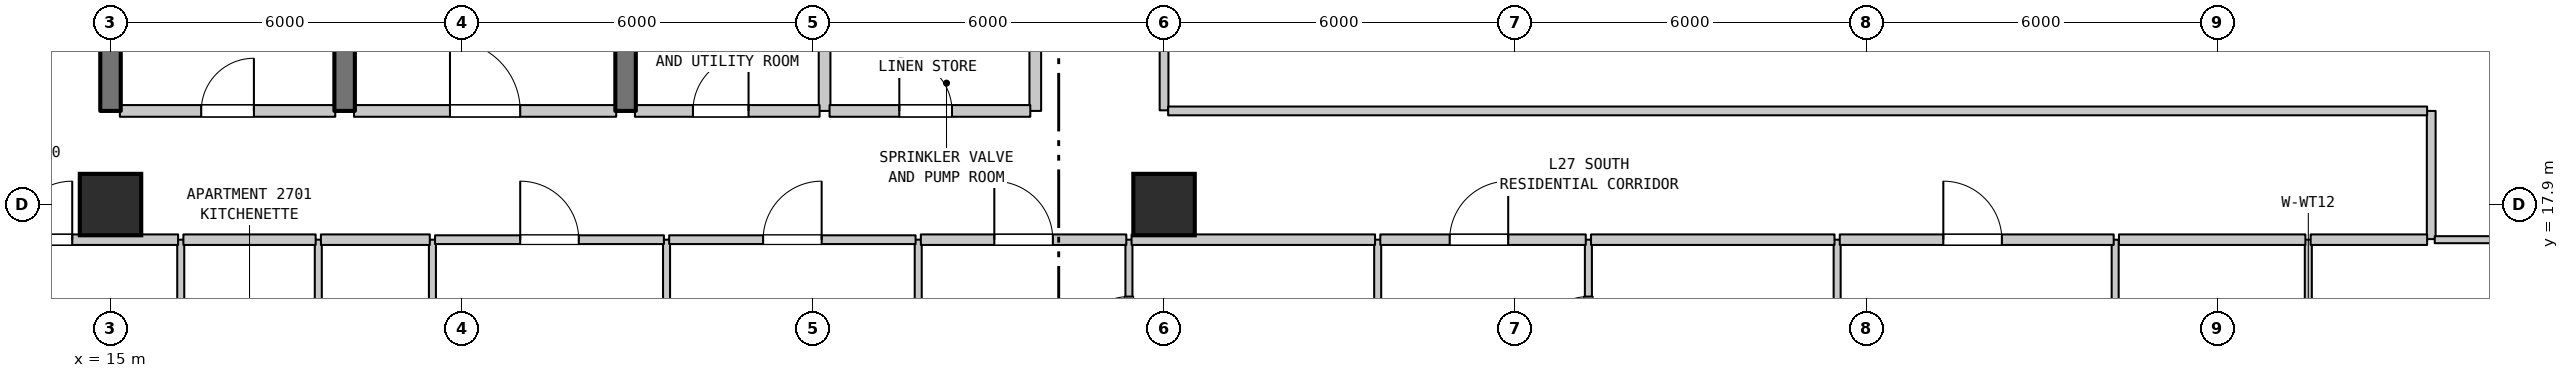
"""IFC4 building model, lengths in metres.
Left out: names, types, materials, properties, quantities, classifications, styles, units other than length and angle.
Written with IfcOpenShell. Run it as: python <this file> out.ifc"""

import sys

from ifc_helpers import new_model, si_unit, direction, frame, frame_2d, origin, origin_2d, place, context, subcontext, project, spatial, rectangle, extrude, element, fill, save


model = new_model("IFC4")
c1 = context("Model", 3, precision=1e-05, world=origin(), true_north=direction((0.0, 1.0)))
c2 = subcontext(c1, "Body", "Model", "MODEL_VIEW")
j1 = project(units=[si_unit("LENGTHUNIT", "METRE"), si_unit("PLANEANGLEUNIT", "RADIAN")], contexts=[c1])
p1 = place(None, origin())
s1 = spatial("IfcSite", under=j1, at=p1, CompositionType="ELEMENT")
p2 = place(p1, origin())
s2 = spatial("IfcBuilding", under=s1, at=p2, CompositionType="ELEMENT")
p3 = place(p2, frame((0.0, 0.0, 113.1)))
s3 = spatial("IfcBuildingStorey", under=s2, at=p3, CompositionType="ELEMENT", Elevation=113.1)
for number, where, z_axis, x_axis in (
    (1, (15.0, 17.9, 0.0), (0.0, 0.0, 1.0), (1.0, 0.0, 0.0)),
    (2, (33.0, 17.9, 0.0), (0.0, 0.0, 1.0), (1.0, 0.0, 0.0)),
):
    element("IfcColumn", number, at=place(p3, frame(where, z_axis=z_axis, x_axis=x_axis)), inside=s3, PredefinedType="COLUMN", context=c2, shape_type="SweptSolid", body=[
        extrude(rectangle(XDim=1.05, YDim=1.05, at=origin_2d()), origin(), (0.0, 0.0, 1.0), 3.7),
    ])
p4 = place(p3, frame((15.0, 19.5, 0.0), z_axis=(0.0, 0.0, 1.0), x_axis=(0.0, 1.0, 0.0)))
e3 = element("IfcWall", 3, at=p4, inside=s3, PredefinedType="SHEAR", context=c2, shape_type="SweptSolid", body=[
    extrude(rectangle(XDim=3.2, YDim=0.35, at=frame_2d((1.6, 0.0))), origin(), (0.0, 0.0, 1.0), 3.385),
])
p5 = place(p3, frame((16.2, 14.1, 0.0), z_axis=(0.0, 0.0, 1.0), x_axis=(0.0, 1.0, 0.0)))
e4 = element("IfcWall", 4, at=p5, inside=s3, PredefinedType="PARTITIONING", context=c2, shape_type="SweptSolid", body=[
    extrude(rectangle(XDim=3.2, YDim=0.12, at=frame_2d((1.6, 0.0))), origin(), (0.0, 0.0, 1.0), 3.385),
])
p6 = place(p5, frame((1.15, 0.0, 0.0)))
e5 = element("IfcOpeningElement", 5, at=p6, cuts=e4, PredefinedType="OPENING", context=c2, shape_type="SweptSolid", body=[
    extrude(rectangle(XDim=0.9, YDim=2.15, at=frame_2d((0.45, 1.075))), frame((0.0, 0.07, 0.0), z_axis=(0.0, -1.0, 0.0), x_axis=(1.0, 0.0, 0.0)), (0.0, 0.0, 1.0), 0.14),
])
p7 = place(p3, frame((18.55, 14.1, 0.0), z_axis=(0.0, 0.0, 1.0), x_axis=(0.0, 1.0, 0.0)))
e6 = element("IfcWall", 6, at=p7, inside=s3, PredefinedType="PARTITIONING", context=c2, shape_type="SweptSolid", body=[
    extrude(rectangle(XDim=3.2, YDim=0.12, at=frame_2d((1.6, 0.0))), origin(), (0.0, 0.0, 1.0), 3.385),
])
p8 = place(p3, frame((19.0, 19.5, 0.0), z_axis=(0.0, 0.0, 1.0), x_axis=(0.0, 1.0, 0.0)))
e7 = element("IfcWall", 7, at=p8, inside=s3, PredefinedType="SHEAR", context=c2, shape_type="SweptSolid", body=[
    extrude(rectangle(XDim=3.2, YDim=0.35, at=frame_2d((1.6, 0.0))), origin(), (0.0, 0.0, 1.0), 3.385),
])
p9 = place(p3, frame((20.5, 7.154, 0.0), z_axis=(0.0, 0.0, 1.0), x_axis=(0.0, 1.0, 0.0)))
e8 = element("IfcWall", 8, at=p9, inside=s3, PredefinedType="PARTITIONING", context=c2, shape_type="SweptSolid", body=[
    extrude(rectangle(XDim=10.146, YDim=0.12, at=frame_2d((5.073, 0.0))), origin(), (0.0, 0.0, 1.0), 3.385),
])
p10 = place(p3, frame((23.8, 19.5, 0.0), z_axis=(0.0, 0.0, 1.0), x_axis=(0.0, 1.0, 0.0)))
e9 = element("IfcWall", 9, at=p10, inside=s3, PredefinedType="SHEAR", context=c2, shape_type="SweptSolid", body=[
    extrude(rectangle(XDim=3.2, YDim=0.35, at=frame_2d((1.6, 0.0))), origin(), (0.0, 0.0, 1.0), 3.385),
])
p11 = place(p3, frame((24.5, 0.71, 0.0), z_axis=(0.0, 0.0, 1.0), x_axis=(0.0, 1.0, 0.0)))
e10 = element("IfcWall", 10, at=p11, inside=s3, PredefinedType="PARTITIONING", context=c2, shape_type="SweptSolid", body=[
    extrude(rectangle(XDim=16.59, YDim=0.12, at=frame_2d((8.295, 0.0))), origin(), (0.0, 0.0, 1.0), 3.385),
])
p12 = place(p3, frame((27.2, 19.5, 0.0), z_axis=(0.0, 0.0, 1.0), x_axis=(0.0, 1.0, 0.0)))
e11 = element("IfcWall", 11, at=p12, inside=s3, PredefinedType="STANDARD", context=c2, shape_type="SweptSolid", body=[
    extrude(rectangle(XDim=1.6, YDim=0.2, at=frame_2d((0.8, 0.0))), origin(), (0.0, 0.0, 1.0), 3.385),
])
p13 = place(p3, frame((28.8, 0.71, 0.0), z_axis=(0.0, 0.0, 1.0), x_axis=(0.0, 1.0, 0.0)))
e12 = element("IfcWall", 12, at=p13, inside=s3, PredefinedType="PARTITIONING", context=c2, shape_type="SweptSolid", body=[
    extrude(rectangle(XDim=16.59, YDim=0.12, at=frame_2d((8.295, 0.0))), origin(), (0.0, 0.0, 1.0), 3.385),
])
p14 = place(p3, frame((30.8, 19.5, 0.0), z_axis=(0.0, 0.0, 1.0), x_axis=(0.0, 1.0, 0.0)))
e13 = element("IfcWall", 13, at=p14, inside=s3, PredefinedType="STANDARD", context=c2, shape_type="SweptSolid", body=[
    extrude(rectangle(XDim=1.6, YDim=0.2, at=frame_2d((0.8, 0.0))), origin(), (0.0, 0.0, 1.0), 3.385),
])
p15 = place(p3, frame((32.4, 14.6, 0.0), z_axis=(0.0, 0.0, 1.0), x_axis=(0.0, 1.0, 0.0)))
e14 = element("IfcWall", 14, at=p15, inside=s3, PredefinedType="PARTITIONING", context=c2, shape_type="SweptSolid", body=[
    extrude(rectangle(XDim=2.7, YDim=0.12, at=frame_2d((1.35, 0.0))), origin(), (0.0, 0.0, 1.0), 3.385),
])
p16 = place(p15, frame((0.828, 0.0, 0.0)))
e15 = element("IfcOpeningElement", 15, at=p16, cuts=e14, PredefinedType="OPENING", context=c2, shape_type="SweptSolid", body=[
    extrude(rectangle(XDim=0.9, YDim=2.1, at=frame_2d((0.45, 1.05))), frame((0.0, 0.07, 0.0), z_axis=(0.0, -1.0, 0.0), x_axis=(1.0, 0.0, 0.0)), (0.0, 0.0, 1.0), 0.14),
])
p17 = place(p3, frame((33.0, 19.51, 0.0), z_axis=(0.0, 0.0, 1.0), x_axis=(0.0, 1.0, 0.0)))
e16 = element("IfcWall", 16, at=p17, inside=s3, PredefinedType="STANDARD", context=c2, shape_type="SweptSolid", body=[
    extrude(rectangle(XDim=6.18, YDim=0.15, at=frame_2d((3.09, 0.0))), origin(), (0.0, 0.0, 1.0), 2.935),
])
p18 = place(p3, frame((36.65, 14.6, 0.0), z_axis=(0.0, 0.0, 1.0), x_axis=(0.0, 1.0, 0.0)))
e17 = element("IfcWall", 17, at=p18, inside=s3, PredefinedType="PARTITIONING", context=c2, shape_type="SweptSolid", body=[
    extrude(rectangle(XDim=2.7, YDim=0.12, at=frame_2d((1.35, 0.0))), origin(), (0.0, 0.0, 1.0), 3.385),
])
p19 = place(p3, frame((40.25, 14.6, 0.0), z_axis=(0.0, 0.0, 1.0), x_axis=(0.0, 1.0, 0.0)))
e18 = element("IfcWall", 18, at=p19, inside=s3, PredefinedType="PARTITIONING", context=c2, shape_type="SweptSolid", body=[
    extrude(rectangle(XDim=2.7, YDim=0.12, at=frame_2d((1.35, 0.0))), origin(), (0.0, 0.0, 1.0), 3.385),
])
p20 = place(p19, frame((0.828, 0.0, 0.0)))
e19 = element("IfcOpeningElement", 19, at=p20, cuts=e18, PredefinedType="OPENING", context=c2, shape_type="SweptSolid", body=[
    extrude(rectangle(XDim=0.9, YDim=2.1, at=frame_2d((0.45, 1.05))), frame((0.0, 0.07, 0.0), z_axis=(0.0, -1.0, 0.0), x_axis=(1.0, 0.0, 0.0)), (0.0, 0.0, 1.0), 0.14),
])
p21 = place(p3, frame((44.5, 14.85, 0.0), z_axis=(0.0, 0.0, 1.0), x_axis=(0.0, 1.0, 0.0)))
e20 = element("IfcWall", 20, at=p21, inside=s3, PredefinedType="PARTITIONING", context=c2, shape_type="SweptSolid", body=[
    extrude(rectangle(XDim=2.45, YDim=0.12, at=frame_2d((1.225, 0.0))), origin(), (0.0, 0.0, 1.0), 3.385),
])
for number, where, z_axis, x_axis in (
    (21, (49.25, 11.15, 0.0), (0.0, 0.0, 1.0), (0.0, 1.0, 0.0)),
    (22, (52.55, 11.15, 0.0), (0.0, 0.0, 1.0), (0.0, 1.0, 0.0)),
):
    element("IfcWall", number, at=place(p3, frame(where, z_axis=z_axis, x_axis=x_axis)), inside=s3, PredefinedType="PARTITIONING", context=c2, shape_type="SweptSolid", body=[
        extrude(rectangle(XDim=6.15, YDim=0.12, at=frame_2d((3.075, 0.0))), origin(), (0.0, 0.0, 1.0), 3.385),
    ])
p22 = place(p3, frame((54.65, 17.31, 0.0), z_axis=(0.0, 0.0, 1.0), x_axis=(0.0, 1.0, 0.0)))
e23 = element("IfcWall", 23, at=p22, inside=s3, PredefinedType="STANDARD", context=c2, shape_type="SweptSolid", body=[
    extrude(rectangle(XDim=2.19, YDim=0.15, at=frame_2d((1.095, 0.0))), origin(), (0.0, 0.0, 1.0), 3.385),
])
p23 = place(p3, frame((12.875, 17.3, 0.0), z_axis=(0.0, 0.0, 1.0), x_axis=(1.0, 0.0, 0.0)))
e24 = element("IfcWall", 24, at=p23, inside=s3, PredefinedType="STANDARD", context=c2, shape_type="SweptSolid", body=[
    extrude(rectangle(XDim=3.28, YDim=0.18, at=frame_2d((1.64, 0.0))), origin(), (0.0, 0.0, 1.0), 3.385),
])
p24 = place(p23, frame((0.471, 0.0, 0.0)))
e25 = element("IfcOpeningElement", 25, at=p24, cuts=e24, PredefinedType="OPENING", context=c2, shape_type="SweptSolid", body=[
    extrude(rectangle(XDim=1.0, YDim=2.15, at=frame_2d((0.5, 1.075))), frame((0.0, 0.1, 0.0), z_axis=(0.0, -1.0, 0.0), x_axis=(1.0, 0.0, 0.0)), (0.0, 0.0, 1.0), 0.2),
])
p25 = place(p3, frame((16.245, 17.3, 0.0), z_axis=(0.0, 0.0, 1.0), x_axis=(1.0, 0.0, 0.0)))
e26 = element("IfcWall", 26, at=p25, inside=s3, PredefinedType="STANDARD", context=c2, shape_type="SweptSolid", body=[
    extrude(rectangle(XDim=2.26, YDim=0.18, at=frame_2d((1.13, 0.0))), origin(), (0.0, 0.0, 1.0), 3.385),
])
p26 = place(p3, frame((18.595, 17.3, 0.0), z_axis=(0.0, 0.0, 1.0), x_axis=(1.0, 0.0, 0.0)))
e27 = element("IfcWall", 27, at=p26, inside=s3, PredefinedType="STANDARD", context=c2, shape_type="SweptSolid", body=[
    extrude(rectangle(XDim=1.86, YDim=0.18, at=frame_2d((0.93, 0.0))), origin(), (0.0, 0.0, 1.0), 3.385),
])
p27 = place(p3, frame((20.545, 17.3, 0.0), z_axis=(0.0, 0.0, 1.0), x_axis=(1.0, 0.0, 0.0)))
e28 = element("IfcWall", 28, at=p27, inside=s3, PredefinedType="STANDARD", context=c2, shape_type="SweptSolid", body=[
    extrude(rectangle(XDim=3.91, YDim=0.15, at=frame_2d((1.955, 0.0))), origin(), (0.0, 0.0, 1.0), 3.385),
])
p28 = place(p27, frame((1.455, 0.0, 0.0)))
e29 = element("IfcOpeningElement", 29, at=p28, cuts=e28, PredefinedType="OPENING", context=c2, shape_type="SweptSolid", body=[
    extrude(rectangle(XDim=1.0, YDim=2.15, at=frame_2d((0.5, 1.075))), frame((0.0, 0.085, 0.0), z_axis=(0.0, -1.0, 0.0), x_axis=(1.0, 0.0, 0.0)), (0.0, 0.0, 1.0), 0.17),
])
p29 = place(p3, frame((24.545, 17.3, 0.0), z_axis=(0.0, 0.0, 1.0), x_axis=(1.0, 0.0, 0.0)))
e30 = element("IfcWall", 30, at=p29, inside=s3, PredefinedType="STANDARD", context=c2, shape_type="SweptSolid", body=[
    extrude(rectangle(XDim=4.21, YDim=0.15, at=frame_2d((2.105, 0.0))), origin(), (0.0, 0.0, 1.0), 3.385),
])
p30 = place(p29, frame((1.605, 0.0, 0.0)))
e31 = element("IfcOpeningElement", 31, at=p30, cuts=e30, PredefinedType="OPENING", context=c2, shape_type="SweptSolid", body=[
    extrude(rectangle(XDim=1.0, YDim=2.15, at=frame_2d((0.5, 1.075))), frame((0.0, 0.085, 0.0), z_axis=(0.0, -1.0, 0.0), x_axis=(1.0, 0.0, 0.0)), (0.0, 0.0, 1.0), 0.17),
])
p31 = place(p3, frame((28.845, 17.3, 0.0), z_axis=(0.0, 0.0, 1.0), x_axis=(1.0, 0.0, 0.0)))
e32 = element("IfcWall", 32, at=p31, inside=s3, PredefinedType="STANDARD", context=c2, shape_type="SweptSolid", body=[
    extrude(rectangle(XDim=3.51, YDim=0.18, at=frame_2d((1.755, 0.0))), origin(), (0.0, 0.0, 1.0), 3.385),
])
p32 = place(p31, frame((1.255, 0.0, 0.0)))
e33 = element("IfcOpeningElement", 33, at=p32, cuts=e32, PredefinedType="OPENING", context=c2, shape_type="SweptSolid", body=[
    extrude(rectangle(XDim=1.0, YDim=2.15, at=frame_2d((0.5, 1.075))), frame((0.0, 0.1, 0.0), z_axis=(0.0, -1.0, 0.0), x_axis=(1.0, 0.0, 0.0)), (0.0, 0.0, 1.0), 0.2),
])
p33 = place(p3, frame((32.445, 17.3, 0.0), z_axis=(0.0, 0.0, 1.0), x_axis=(1.0, 0.0, 0.0)))
e34 = element("IfcWall", 34, at=p33, inside=s3, PredefinedType="STANDARD", context=c2, shape_type="SweptSolid", body=[
    extrude(rectangle(XDim=4.16, YDim=0.18, at=frame_2d((2.08, 0.0))), origin(), (0.0, 0.0, 1.0), 3.385),
])
p34 = place(p3, frame((36.695, 17.3, 0.0), z_axis=(0.0, 0.0, 1.0), x_axis=(1.0, 0.0, 0.0)))
e35 = element("IfcWall", 35, at=p34, inside=s3, PredefinedType="STANDARD", context=c2, shape_type="SweptSolid", body=[
    extrude(rectangle(XDim=3.51, YDim=0.18, at=frame_2d((1.755, 0.0))), origin(), (0.0, 0.0, 1.0), 3.385),
])
p35 = place(p34, frame((1.185, 0.0, 0.0)))
e36 = element("IfcOpeningElement", 36, at=p35, cuts=e35, PredefinedType="OPENING", context=c2, shape_type="SweptSolid", body=[
    extrude(rectangle(XDim=1.0, YDim=2.15, at=frame_2d((0.5, 1.075))), frame((0.0, 0.1, 0.0), z_axis=(0.0, -1.0, 0.0), x_axis=(1.0, 0.0, 0.0)), (0.0, 0.0, 1.0), 0.2),
])
p36 = place(p3, frame((40.295, 17.3, 0.0), z_axis=(0.0, 0.0, 1.0), x_axis=(1.0, 0.0, 0.0)))
e37 = element("IfcWall", 37, at=p36, inside=s3, PredefinedType="STANDARD", context=c2, shape_type="SweptSolid", body=[
    extrude(rectangle(XDim=4.16, YDim=0.18, at=frame_2d((2.08, 0.0))), origin(), (0.0, 0.0, 1.0), 3.385),
])
p37 = place(p3, frame((44.545, 17.3, 0.0), z_axis=(0.0, 0.0, 1.0), x_axis=(1.0, 0.0, 0.0)))
e38 = element("IfcWall", 38, at=p37, inside=s3, PredefinedType="STANDARD", context=c2, shape_type="SweptSolid", body=[
    extrude(rectangle(XDim=4.68, YDim=0.18, at=frame_2d((2.34, 0.0))), origin(), (0.0, 0.0, 1.0), 3.385),
])
p38 = place(p37, frame((1.769, 0.0, 0.0)))
e39 = element("IfcOpeningElement", 39, at=p38, cuts=e38, PredefinedType="OPENING", context=c2, shape_type="SweptSolid", body=[
    extrude(rectangle(XDim=1.0, YDim=2.15, at=frame_2d((0.5, 1.075))), frame((0.0, 0.1, 0.0), z_axis=(0.0, -1.0, 0.0), x_axis=(1.0, 0.0, 0.0)), (0.0, 0.0, 1.0), 0.2),
])
p39 = place(p3, frame((49.315, 17.3, 0.0), z_axis=(0.0, 0.0, 1.0), x_axis=(1.0, 0.0, 0.0)))
e40 = element("IfcWall", 40, at=p39, inside=s3, PredefinedType="STANDARD", context=c2, shape_type="SweptSolid", body=[
    extrude(rectangle(XDim=3.185, YDim=0.18, at=frame_2d((1.593, 0.0))), origin(), (0.0, 0.0, 1.0), 3.385),
])
p40 = place(p3, frame((52.59, 17.3, 0.0), z_axis=(0.0, 0.0, 1.0), x_axis=(1.0, 0.0, 0.0)))
e41 = element("IfcWall", 41, at=p40, inside=s3, PredefinedType="STANDARD", context=c2, shape_type="SweptSolid", body=[
    extrude(rectangle(XDim=1.99, YDim=0.18, at=frame_2d((0.995, 0.0))), origin(), (0.0, 0.0, 1.0), 3.385),
])
p41 = place(p3, frame((54.71, 17.3, 0.0), z_axis=(0.0, 0.0, 1.0), x_axis=(1.0, 0.0, 0.0)))
e42 = element("IfcWall", 42, at=p41, inside=s3, PredefinedType="PARTITIONING", context=c2, shape_type="SweptSolid", body=[
    extrude(rectangle(XDim=1.635, YDim=0.12, at=frame_2d((0.817, 0.0))), origin(), (0.0, 0.0, 1.0), 3.385),
])
p42 = place(p3, frame((15.16, 19.5, 0.0), z_axis=(0.0, 0.0, 1.0), x_axis=(1.0, 0.0, 0.0)))
e43 = element("IfcWall", 43, at=p42, inside=s3, PredefinedType="STANDARD", context=c2, shape_type="SweptSolid", body=[
    extrude(rectangle(XDim=3.68, YDim=0.2, at=frame_2d((1.84, 0.0))), origin(), (0.0, 0.0, 1.0), 3.385),
])
p43 = place(p42, frame((1.39, 0.0, 0.0)))
e44 = element("IfcOpeningElement", 44, at=p43, cuts=e43, PredefinedType="OPENING", context=c2, shape_type="SweptSolid", body=[
    extrude(rectangle(XDim=0.9, YDim=2.15, at=frame_2d((0.45, 1.075))), frame((0.0, 0.11, 0.0), z_axis=(0.0, -1.0, 0.0), x_axis=(1.0, 0.0, 0.0)), (0.0, 0.0, 1.0), 0.22),
])
p44 = place(p3, frame((19.16, 19.5, 0.0), z_axis=(0.0, 0.0, 1.0), x_axis=(1.0, 0.0, 0.0)))
e45 = element("IfcWall", 45, at=p44, inside=s3, PredefinedType="STANDARD", context=c2, shape_type="SweptSolid", body=[
    extrude(rectangle(XDim=4.48, YDim=0.2, at=frame_2d((2.24, 0.0))), origin(), (0.0, 0.0, 1.0), 3.385),
])
p45 = place(p44, frame((1.64, 0.0, 0.0)))
e46 = element("IfcOpeningElement", 46, at=p45, cuts=e45, PredefinedType="OPENING", context=c2, shape_type="SweptSolid", body=[
    extrude(rectangle(XDim=1.2, YDim=2.2, at=frame_2d((0.6, 1.1))), frame((0.0, 0.11, 0.0), z_axis=(0.0, -1.0, 0.0), x_axis=(1.0, 0.0, 0.0)), (0.0, 0.0, 1.0), 0.22),
])
p46 = place(p3, frame((23.96, 19.5, 0.0), z_axis=(0.0, 0.0, 1.0), x_axis=(1.0, 0.0, 0.0)))
e47 = element("IfcWall", 47, at=p46, inside=s3, PredefinedType="STANDARD", context=c2, shape_type="SweptSolid", body=[
    extrude(rectangle(XDim=3.155, YDim=0.2, at=frame_2d((1.578, 0.0))), origin(), (0.0, 0.0, 1.0), 3.385),
])
p47 = place(p46, frame((0.991, 0.0, 0.0)))
e48 = element("IfcOpeningElement", 48, at=p47, cuts=e47, PredefinedType="OPENING", context=c2, shape_type="SweptSolid", body=[
    extrude(rectangle(XDim=0.95, YDim=2.15, at=frame_2d((0.475, 1.075))), frame((0.0, 0.11, 0.0), z_axis=(0.0, -1.0, 0.0), x_axis=(1.0, 0.0, 0.0)), (0.0, 0.0, 1.0), 0.22),
])
p48 = place(p3, frame((27.285, 19.5, 0.0), z_axis=(0.0, 0.0, 1.0), x_axis=(1.0, 0.0, 0.0)))
e49 = element("IfcWall", 49, at=p48, inside=s3, PredefinedType="STANDARD", context=c2, shape_type="SweptSolid", body=[
    extrude(rectangle(XDim=3.43, YDim=0.2, at=frame_2d((1.715, 0.0))), origin(), (0.0, 0.0, 1.0), 3.385),
])
p49 = place(p48, frame((1.192, 0.0, 0.0)))
e50 = element("IfcOpeningElement", 50, at=p49, cuts=e49, PredefinedType="OPENING", context=c2, shape_type="SweptSolid", body=[
    extrude(rectangle(XDim=0.9, YDim=2.15, at=frame_2d((0.45, 1.075))), frame((0.0, 0.11, 0.0), z_axis=(0.0, -1.0, 0.0), x_axis=(1.0, 0.0, 0.0)), (0.0, 0.0, 1.0), 0.22),
])
p50 = place(p3, frame((33.07, 19.5, 0.0), z_axis=(0.0, 0.0, 1.0), x_axis=(1.0, 0.0, 0.0)))
e51 = element("IfcWall", 51, at=p50, inside=s3, PredefinedType="STANDARD", context=c2, shape_type="SweptSolid", body=[
    extrude(rectangle(XDim=21.51, YDim=0.15, at=frame_2d((10.755, 0.0))), origin(), (0.0, 0.0, 1.0), 3.385),
])
p51 = place(p16, origin())
e52 = element("IfcDoor", 52, at=p51, inside=s3, OperationType="SINGLE_SWING_LEFT", PredefinedType="DOOR", context=c2, shape_type="SweptSolid", body=[
    extrude(rectangle(XDim=0.9, YDim=2.1, at=frame_2d((0.45, 1.05))), frame((0.0, 0.025, 0.0), z_axis=(0.0, -1.0, 0.0), x_axis=(1.0, 0.0, 0.0)), (0.0, 0.0, 1.0), 0.05),
])
fill(e15, e52)
p52 = place(p20, origin())
e53 = element("IfcDoor", 53, at=p52, inside=s3, OperationType="SINGLE_SWING_LEFT", PredefinedType="DOOR", context=c2, shape_type="SweptSolid", body=[
    extrude(rectangle(XDim=0.9, YDim=2.1, at=frame_2d((0.45, 1.05))), frame((0.0, 0.025, 0.0), z_axis=(0.0, -1.0, 0.0), x_axis=(1.0, 0.0, 0.0)), (0.0, 0.0, 1.0), 0.05),
])
fill(e19, e53)
p53 = place(p24, origin())
e54 = element("IfcDoor", 54, at=p53, inside=s3, OperationType="SINGLE_SWING_RIGHT", PredefinedType="DOOR", context=c2, shape_type="SweptSolid", body=[
    extrude(rectangle(XDim=1.0, YDim=2.15, at=frame_2d((0.5, 1.075))), frame((0.0, 0.025, 0.0), z_axis=(0.0, -1.0, 0.0), x_axis=(1.0, 0.0, 0.0)), (0.0, 0.0, 1.0), 0.05),
])
fill(e25, e54)
p54 = place(p28, origin())
e55 = element("IfcDoor", 55, at=p54, inside=s3, OperationType="SINGLE_SWING_LEFT", PredefinedType="DOOR", context=c2, shape_type="SweptSolid", body=[
    extrude(rectangle(XDim=1.0, YDim=2.15, at=frame_2d((0.5, 1.075))), frame((0.0, 0.025, 0.0), z_axis=(0.0, -1.0, 0.0), x_axis=(1.0, 0.0, 0.0)), (0.0, 0.0, 1.0), 0.05),
])
fill(e29, e55)
p55 = place(p30, origin())
e56 = element("IfcDoor", 56, at=p55, inside=s3, OperationType="SINGLE_SWING_RIGHT", PredefinedType="DOOR", context=c2, shape_type="SweptSolid", body=[
    extrude(rectangle(XDim=1.0, YDim=2.15, at=frame_2d((0.5, 1.075))), frame((0.0, 0.025, 0.0), z_axis=(0.0, -1.0, 0.0), x_axis=(1.0, 0.0, 0.0)), (0.0, 0.0, 1.0), 0.05),
])
fill(e31, e56)
p56 = place(p32, origin())
e57 = element("IfcDoor", 57, at=p56, inside=s3, OperationType="SINGLE_SWING_LEFT", PredefinedType="DOOR", context=c2, shape_type="SweptSolid", body=[
    extrude(rectangle(XDim=1.0, YDim=2.15, at=frame_2d((0.5, 1.075))), frame((0.0, 0.025, 0.0), z_axis=(0.0, -1.0, 0.0), x_axis=(1.0, 0.0, 0.0)), (0.0, 0.0, 1.0), 0.05),
])
fill(e33, e57)
p57 = place(p35, origin())
e58 = element("IfcDoor", 58, at=p57, inside=s3, OperationType="SINGLE_SWING_RIGHT", PredefinedType="DOOR", context=c2, shape_type="SweptSolid", body=[
    extrude(rectangle(XDim=1.0, YDim=2.15, at=frame_2d((0.5, 1.075))), frame((0.0, 0.025, 0.0), z_axis=(0.0, -1.0, 0.0), x_axis=(1.0, 0.0, 0.0)), (0.0, 0.0, 1.0), 0.05),
])
fill(e36, e58)
p58 = place(p38, origin())
e59 = element("IfcDoor", 59, at=p58, inside=s3, OperationType="SINGLE_SWING_LEFT", PredefinedType="DOOR", context=c2, shape_type="SweptSolid", body=[
    extrude(rectangle(XDim=1.0, YDim=2.15, at=frame_2d((0.5, 1.075))), frame((0.0, 0.025, 0.0), z_axis=(0.0, -1.0, 0.0), x_axis=(1.0, 0.0, 0.0)), (0.0, 0.0, 1.0), 0.05),
])
fill(e39, e59)
p59 = place(p43, origin())
e60 = element("IfcDoor", 60, at=p59, inside=s3, OperationType="SINGLE_SWING_RIGHT", PredefinedType="DOOR", context=c2, shape_type="SweptSolid", body=[
    extrude(rectangle(XDim=0.9, YDim=2.15, at=frame_2d((0.45, 1.075))), frame((0.0, 0.025, 0.0), z_axis=(0.0, -1.0, 0.0), x_axis=(1.0, 0.0, 0.0)), (0.0, 0.0, 1.0), 0.05),
])
fill(e44, e60)
p60 = place(p45, origin())
e61 = element("IfcDoor", 61, at=p60, inside=s3, OperationType="SINGLE_SWING_LEFT", PredefinedType="DOOR", context=c2, shape_type="SweptSolid", body=[
    extrude(rectangle(XDim=1.2, YDim=2.2, at=frame_2d((0.6, 1.1))), frame((0.0, 0.025, 0.0), z_axis=(0.0, -1.0, 0.0), x_axis=(1.0, 0.0, 0.0)), (0.0, 0.0, 1.0), 0.05),
])
fill(e46, e61)
p61 = place(p47, origin())
e62 = element("IfcDoor", 62, at=p61, inside=s3, OperationType="SINGLE_SWING_RIGHT", PredefinedType="DOOR", context=c2, shape_type="SweptSolid", body=[
    extrude(rectangle(XDim=0.95, YDim=2.15, at=frame_2d((0.475, 1.075))), frame((0.0, 0.025, 0.0), z_axis=(0.0, -1.0, 0.0), x_axis=(1.0, 0.0, 0.0)), (0.0, 0.0, 1.0), 0.05),
])
fill(e48, e62)
p62 = place(p49, origin())
e63 = element("IfcDoor", 63, at=p62, inside=s3, OperationType="SINGLE_SWING_LEFT", PredefinedType="DOOR", context=c2, shape_type="SweptSolid", body=[
    extrude(rectangle(XDim=0.9, YDim=2.15, at=frame_2d((0.45, 1.075))), frame((0.0, 0.025, 0.0), z_axis=(0.0, -1.0, 0.0), x_axis=(1.0, 0.0, 0.0)), (0.0, 0.0, 1.0), 0.05),
])
fill(e50, e63)
save(model, sys.argv[1])
